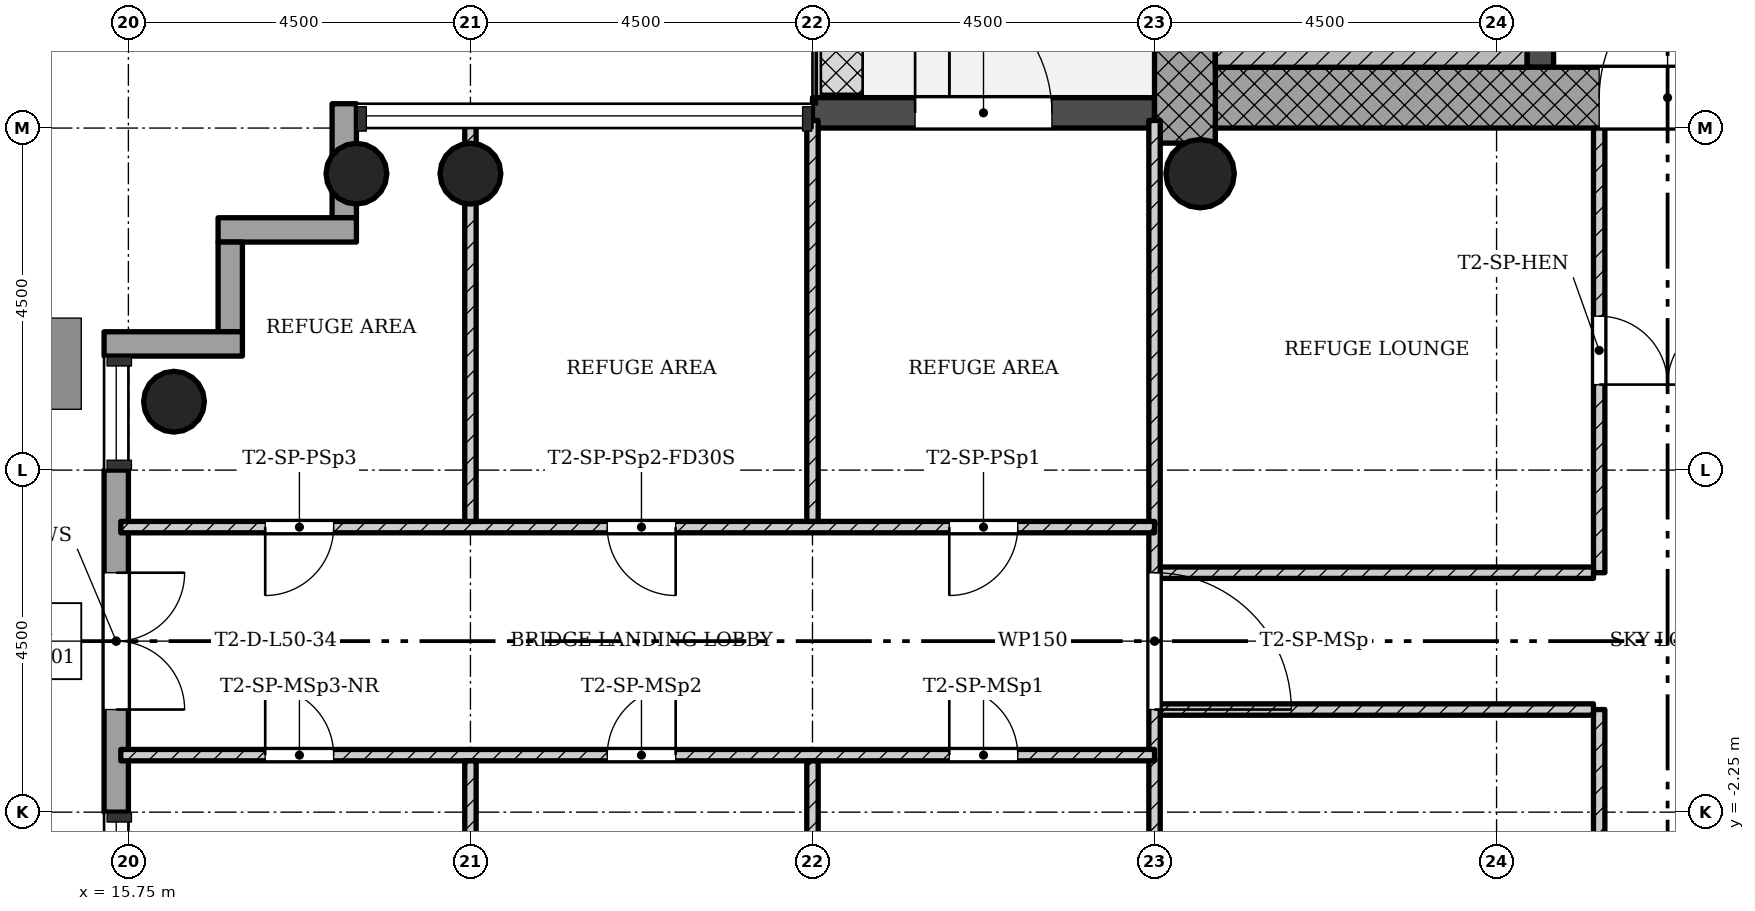
"""IFC4 building model, lengths in metres.
Left out: names, types, materials, properties, quantities, classifications, styles, units other than length and angle.
Written with IfcOpenShell. Run it as: python <this file> out.ifc"""

import sys

from ifc_helpers import new_model, si_unit, direction, frame, frame_2d, origin, origin_2d, place, context, subcontext, project, spatial, rectangle, hollow_circle, extrude, element, fill, save


model = new_model("IFC4")
c1 = context("Model", 3, precision=1e-05, world=origin(), true_north=direction((0.0, 1.0)))
c2 = subcontext(c1, "Body", "Model", "MODEL_VIEW")
j1 = project(units=[si_unit("LENGTHUNIT", "METRE"), si_unit("PLANEANGLEUNIT", "RADIAN")], contexts=[c1])
p1 = place(None, origin())
s1 = spatial("IfcSite", under=j1, at=p1, CompositionType="ELEMENT")
p2 = place(p1, origin())
s2 = spatial("IfcBuilding", under=s1, at=p2, CompositionType="ELEMENT")
p3 = place(p2, frame((0.0, 0.0, 181.3)))
s3 = spatial("IfcBuildingStorey", under=s2, at=p3, CompositionType="ELEMENT", Elevation=181.3)
p4 = place(p3, frame((30.05, 7.15, 0.0), z_axis=(0.0, 0.0, 1.0), x_axis=(1.0, 0.0, 0.0)))
e1 = element("IfcWall", 1, at=p4, inside=s3, PredefinedType="SHEAR", context=c2, shape_type="SweptSolid", body=[
    extrude(rectangle(XDim=12.7, YDim=0.8, at=frame_2d((6.35, 0.0))), origin(), (0.0, 0.0, 1.0), 4.5),
])
p5 = place(p4, frame((5.05, 0.0, 0.0)))
e2 = element("IfcOpeningElement", 2, at=p5, cuts=e1, PredefinedType="OPENING", context=c2, shape_type="SweptSolid", body=[
    extrude(rectangle(XDim=1.8, YDim=2.1, at=frame_2d((0.9, 1.05))), frame((0.0, 0.41, 0.0), z_axis=(0.0, -1.0, 0.0), x_axis=(1.0, 0.0, 0.0)), (0.0, 0.0, 1.0), 0.82),
])
p6 = place(p3, frame((29.65, 15.348, 0.0), z_axis=(0.0, 0.0, 1.0), x_axis=(0.0, -1.0, 0.0)))
e3 = element("IfcWall", 3, at=p6, inside=s3, PredefinedType="SHEAR", context=c2, shape_type="SweptSolid", body=[
    extrude(rectangle(XDim=8.796, YDim=0.8, at=frame_2d((4.398, 0.0))), origin(), (0.0, 0.0, 1.0), 4.5),
])
p7 = place(p3, frame((34.325, 7.55, 0.0), z_axis=(0.0, 0.0, 1.0), x_axis=(0.0, 1.0, 0.0)))
e4 = element("IfcWall", 4, at=p7, inside=s3, PredefinedType="SHEAR", context=c2, shape_type="SweptSolid", body=[
    extrude(rectangle(XDim=7.4, YDim=0.35, at=frame_2d((3.7, 0.0))), origin(), (0.0, 0.0, 1.0), 4.5),
])
p8 = place(p7, frame((0.85, 0.0, 0.0)))
e5 = element("IfcOpeningElement", 5, at=p8, cuts=e4, PredefinedType="OPENING", context=c2, shape_type="SweptSolid", body=[
    extrude(rectangle(XDim=0.9, YDim=2.1, at=frame_2d((0.45, 1.05))), frame((0.0, 0.185, 0.0), z_axis=(0.0, -1.0, 0.0), x_axis=(1.0, 0.0, 0.0)), (0.0, 0.0, 1.0), 0.37),
])
for number, where, z_axis, x_axis in (
    (6, (20.25, 6.15, 0.0), (0.0, 0.0, 1.0), (1.0, 0.0, 0.0)),
    (7, (18.75, 6.15, 0.0), (0.0, 0.0, 1.0), (1.0, 0.0, 0.0)),
    (8, (16.35, 3.15, 0.0), (0.0, 0.0, 1.0), (1.0, 0.0, 0.0)),
):
    element("IfcColumn", number, at=place(p3, frame(where, z_axis=z_axis, x_axis=x_axis)), inside=s3, PredefinedType="COLUMN", context=c2, shape_type="SweptSolid", body=[
        extrude(hollow_circle(Radius=0.4, WallThickness=0.028, at=origin_2d()), origin(), (0.0, 0.0, 1.0), 4.5),
    ])
p9 = place(p3, frame((29.85, 6.15, 0.0), z_axis=(0.0, 0.0, 1.0), x_axis=(1.0, 0.0, 0.0)))
e9 = element("IfcColumn", 9, at=p9, inside=s3, PredefinedType="COLUMN", context=c2, shape_type="SweptSolid", body=[
    extrude(hollow_circle(Radius=0.45, WallThickness=0.032, at=origin_2d()), origin(), (0.0, 0.0, 1.0), 4.5),
])
p10 = place(p3, frame((29.25, 6.95, -0.02), z_axis=(0.0, 0.0, 1.0), x_axis=(-1.0, 0.0, 0.0)))
e10 = element("IfcWall", 10, at=p10, inside=s3, PredefinedType="STANDARD", context=c2, shape_type="SweptSolid", body=[
    extrude(rectangle(XDim=4.5, YDim=0.4, at=frame_2d((2.25, 0.0))), origin(), (0.0, 0.0, 1.0), 4.22),
])
p11 = place(p10, frame((1.35, 0.0, 0.02)))
e11 = element("IfcOpeningElement", 11, at=p11, cuts=e10, PredefinedType="OPENING", context=c2, shape_type="SweptSolid", body=[
    extrude(rectangle(XDim=1.8, YDim=2.1, at=frame_2d((0.9, 1.05))), frame((0.0, 0.21, 0.0), z_axis=(0.0, -1.0, 0.0), x_axis=(1.0, 0.0, 0.0)), (0.0, 0.0, 1.0), 0.42),
])
p12 = place(p3, frame((18.59, 7.07, -0.3), z_axis=(0.0, 0.0, 1.0), x_axis=(0.0, -1.0, 0.0)))
e12 = element("IfcWall", 12, at=p12, inside=s3, PredefinedType="STANDARD", context=c2, shape_type="SweptSolid", body=[
    extrude(rectangle(XDim=1.5, YDim=0.32, at=frame_2d((0.75, 0.0))), origin(), (0.0, 0.0, 1.0), 4.5),
])
p13 = place(p3, frame((18.75, 5.41, -0.3), z_axis=(0.0, 0.0, 1.0), x_axis=(-1.0, 0.0, 0.0)))
e13 = element("IfcWall", 13, at=p13, inside=s3, PredefinedType="STANDARD", context=c2, shape_type="SweptSolid", body=[
    extrude(rectangle(XDim=1.82, YDim=0.32, at=frame_2d((0.91, 0.0))), origin(), (0.0, 0.0, 1.0), 4.5),
])
p14 = place(p3, frame((17.09, 5.25, -0.3), z_axis=(0.0, 0.0, 1.0), x_axis=(0.0, -1.0, 0.0)))
e14 = element("IfcWall", 14, at=p14, inside=s3, PredefinedType="STANDARD", context=c2, shape_type="SweptSolid", body=[
    extrude(rectangle(XDim=1.18, YDim=0.32, at=frame_2d((0.59, 0.0))), origin(), (0.0, 0.0, 1.0), 4.5),
])
p15 = place(p3, frame((17.25, 3.91, -0.3), z_axis=(0.0, 0.0, 1.0), x_axis=(-1.0, 0.0, 0.0)))
e15 = element("IfcWall", 15, at=p15, inside=s3, PredefinedType="STANDARD", context=c2, shape_type="SweptSolid", body=[
    extrude(rectangle(XDim=1.82, YDim=0.32, at=frame_2d((0.91, 0.0))), origin(), (0.0, 0.0, 1.0), 4.5),
])
p16 = place(p3, frame((15.59, 2.25, 0.0), z_axis=(0.0, 0.0, 1.0), x_axis=(0.0, -1.0, 0.0)))
e16 = element("IfcWall", 16, at=p16, inside=s3, PredefinedType="STANDARD", context=c2, shape_type="SweptSolid", body=[
    extrude(rectangle(XDim=4.5, YDim=0.32, at=frame_2d((2.25, 0.0))), origin(), (0.0, 0.0, 1.0), 4.2),
])
p17 = place(p16, frame((1.35, 0.0, 0.0)))
e17 = element("IfcOpeningElement", 17, at=p17, cuts=e16, PredefinedType="OPENING", context=c2, shape_type="SweptSolid", body=[
    extrude(rectangle(XDim=1.8, YDim=2.1, at=frame_2d((0.9, 1.05))), frame((0.0, 0.17, 0.0), z_axis=(0.0, -1.0, 0.0), x_axis=(1.0, 0.0, 0.0)), (0.0, 0.0, 1.0), 0.34),
])
p18 = place(p3, frame((35.1, 0.9, 0.0), z_axis=(0.0, 0.0, 1.0), x_axis=(0.0, 1.0, 0.0)))
e18 = element("IfcWall", 18, at=p18, inside=s3, PredefinedType="PARTITIONING", context=c2, shape_type="SweptSolid", body=[
    extrude(rectangle(XDim=5.85, YDim=0.15, at=frame_2d((2.925, 0.0))), origin(), (0.0, 0.0, 1.0), 4.08),
])
p19 = place(p18, frame((2.475, 0.0, 0.0)))
e19 = element("IfcOpeningElement", 19, at=p19, cuts=e18, PredefinedType="OPENING", context=c2, shape_type="SweptSolid", body=[
    extrude(rectangle(XDim=0.9, YDim=2.1, at=frame_2d((0.45, 1.05))), frame((0.0, 0.085, 0.0), z_axis=(0.0, -1.0, 0.0), x_axis=(1.0, 0.0, 0.0)), (0.0, 0.0, 1.0), 0.17),
])
p20 = place(p3, frame((35.025, 0.9, 0.0), z_axis=(0.0, 0.0, 1.0), x_axis=(-1.0, 0.0, 0.0)))
e20 = element("IfcWall", 20, at=p20, inside=s3, PredefinedType="PARTITIONING", context=c2, shape_type="SweptSolid", body=[
    extrude(rectangle(XDim=5.7, YDim=0.15, at=frame_2d((2.85, 0.0))), origin(), (0.0, 0.0, 1.0), 4.08),
])
p21 = place(p3, frame((35.1, -6.75, 0.0), z_axis=(0.0, 0.0, 1.0), x_axis=(0.0, 1.0, 0.0)))
e21 = element("IfcWall", 21, at=p21, inside=s3, PredefinedType="PARTITIONING", context=c2, shape_type="SweptSolid", body=[
    extrude(rectangle(XDim=5.85, YDim=0.15, at=frame_2d((2.925, 0.0))), origin(), (0.0, 0.0, 1.0), 4.08),
])
p22 = place(p21, frame((2.475, 0.0, 0.0)))
e22 = element("IfcOpeningElement", 22, at=p22, cuts=e21, PredefinedType="OPENING", context=c2, shape_type="SweptSolid", body=[
    extrude(rectangle(XDim=0.9, YDim=2.1, at=frame_2d((0.45, 1.05))), frame((0.0, 0.085, 0.0), z_axis=(0.0, -1.0, 0.0), x_axis=(1.0, 0.0, 0.0)), (0.0, 0.0, 1.0), 0.17),
])
p23 = place(p3, frame((35.025, -0.9, 0.0), z_axis=(0.0, 0.0, 1.0), x_axis=(-1.0, 0.0, 0.0)))
e23 = element("IfcWall", 23, at=p23, inside=s3, PredefinedType="PARTITIONING", context=c2, shape_type="SweptSolid", body=[
    extrude(rectangle(XDim=5.7, YDim=0.15, at=frame_2d((2.85, 0.0))), origin(), (0.0, 0.0, 1.0), 4.08),
])
p24 = place(p3, frame((29.25, -6.85, 0.0), z_axis=(0.0, 0.0, 1.0), x_axis=(0.0, 1.0, 0.0)))
e24 = element("IfcWall", 24, at=p24, inside=s3, PredefinedType="PARTITIONING", context=c2, shape_type="SweptSolid", body=[
    extrude(rectangle(XDim=13.7, YDim=0.15, at=frame_2d((6.85, 0.0))), origin(), (0.0, 0.0, 1.0), 4.08),
])
p25 = place(p24, frame((5.95, 0.0, 0.0)))
e25 = element("IfcOpeningElement", 25, at=p25, cuts=e24, PredefinedType="OPENING", context=c2, shape_type="SweptSolid", body=[
    extrude(rectangle(XDim=1.8, YDim=2.1, at=frame_2d((0.9, 1.05))), frame((0.0, 0.085, 0.0), z_axis=(0.0, -1.0, 0.0), x_axis=(1.0, 0.0, 0.0)), (0.0, 0.0, 1.0), 0.17),
])
p26 = place(p3, frame((29.25, 1.5, 0.0), z_axis=(0.0, 0.0, 1.0), x_axis=(-1.0, 0.0, 0.0)))
e26 = element("IfcWall", 26, at=p26, inside=s3, PredefinedType="PARTITIONING", context=c2, shape_type="SweptSolid", body=[
    extrude(rectangle(XDim=13.6, YDim=0.15, at=frame_2d((6.8, 0.0))), origin(), (0.0, 0.0, 1.0), 4.08),
])
p27 = place(p26, frame((1.8, 0.0, 0.0)))
e27 = element("IfcOpeningElement", 27, at=p27, cuts=e26, PredefinedType="OPENING", context=c2, shape_type="SweptSolid", body=[
    extrude(rectangle(XDim=0.9, YDim=2.1, at=frame_2d((0.45, 1.05))), frame((0.0, 0.085, 0.0), z_axis=(0.0, -1.0, 0.0), x_axis=(1.0, 0.0, 0.0)), (0.0, 0.0, 1.0), 0.17),
])
p28 = place(p26, frame((6.3, 0.0, 0.0)))
e28 = element("IfcOpeningElement", 28, at=p28, cuts=e26, PredefinedType="OPENING", context=c2, shape_type="SweptSolid", body=[
    extrude(rectangle(XDim=0.9, YDim=2.1, at=frame_2d((0.45, 1.05))), frame((0.0, 0.085, 0.0), z_axis=(0.0, -1.0, 0.0), x_axis=(1.0, 0.0, 0.0)), (0.0, 0.0, 1.0), 0.17),
])
p29 = place(p26, frame((10.8, 0.0, 0.0)))
e29 = element("IfcOpeningElement", 29, at=p29, cuts=e26, PredefinedType="OPENING", context=c2, shape_type="SweptSolid", body=[
    extrude(rectangle(XDim=0.9, YDim=2.1, at=frame_2d((0.45, 1.05))), frame((0.0, 0.085, 0.0), z_axis=(0.0, -1.0, 0.0), x_axis=(1.0, 0.0, 0.0)), (0.0, 0.0, 1.0), 0.17),
])
for number, where, z_axis, x_axis in (
    (30, (24.75, 1.575, 0.0), (0.0, 0.0, 1.0), (0.0, 1.0, 0.0)),
    (31, (20.25, 1.575, 0.0), (0.0, 0.0, 1.0), (0.0, 1.0, 0.0)),
):
    element("IfcWall", number, at=place(p3, frame(where, z_axis=z_axis, x_axis=x_axis)), inside=s3, PredefinedType="PARTITIONING", context=c2, shape_type="SweptSolid", body=[
        extrude(rectangle(XDim=5.275, YDim=0.15, at=frame_2d((2.638, 0.0))), origin(), (0.0, 0.0, 1.0), 4.08),
    ])
p30 = place(p3, frame((29.25, -1.5, 0.0), z_axis=(0.0, 0.0, 1.0), x_axis=(-1.0, 0.0, 0.0)))
e32 = element("IfcWall", 32, at=p30, inside=s3, PredefinedType="PARTITIONING", context=c2, shape_type="SweptSolid", body=[
    extrude(rectangle(XDim=13.6, YDim=0.15, at=frame_2d((6.8, 0.0))), origin(), (0.0, 0.0, 1.0), 4.08),
])
p31 = place(p30, frame((1.8, 0.0, 0.0)))
e33 = element("IfcOpeningElement", 33, at=p31, cuts=e32, PredefinedType="OPENING", context=c2, shape_type="SweptSolid", body=[
    extrude(rectangle(XDim=0.9, YDim=2.1, at=frame_2d((0.45, 1.05))), frame((0.0, 0.085, 0.0), z_axis=(0.0, -1.0, 0.0), x_axis=(1.0, 0.0, 0.0)), (0.0, 0.0, 1.0), 0.17),
])
p32 = place(p30, frame((6.3, 0.0, 0.0)))
e34 = element("IfcOpeningElement", 34, at=p32, cuts=e32, PredefinedType="OPENING", context=c2, shape_type="SweptSolid", body=[
    extrude(rectangle(XDim=0.9, YDim=2.1, at=frame_2d((0.45, 1.05))), frame((0.0, 0.085, 0.0), z_axis=(0.0, -1.0, 0.0), x_axis=(1.0, 0.0, 0.0)), (0.0, 0.0, 1.0), 0.17),
])
p33 = place(p30, frame((10.8, 0.0, 0.0)))
e35 = element("IfcOpeningElement", 35, at=p33, cuts=e32, PredefinedType="OPENING", context=c2, shape_type="SweptSolid", body=[
    extrude(rectangle(XDim=0.9, YDim=2.1, at=frame_2d((0.45, 1.05))), frame((0.0, 0.085, 0.0), z_axis=(0.0, -1.0, 0.0), x_axis=(1.0, 0.0, 0.0)), (0.0, 0.0, 1.0), 0.17),
])
for number, where, z_axis, x_axis in (
    (36, (24.75, -1.575, 0.0), (0.0, 0.0, 1.0), (0.0, -1.0, 0.0)),
    (37, (20.25, -1.575, 0.0), (0.0, 0.0, 1.0), (0.0, -1.0, 0.0)),
):
    element("IfcWall", number, at=place(p3, frame(where, z_axis=z_axis, x_axis=x_axis)), inside=s3, PredefinedType="PARTITIONING", context=c2, shape_type="SweptSolid", body=[
        extrude(rectangle(XDim=5.275, YDim=0.15, at=frame_2d((2.638, 0.0))), origin(), (0.0, 0.0, 1.0), 4.08),
    ])
p34 = place(p3, frame((34.15, 7.75, 0.0), z_axis=(0.0, 0.0, 1.0), x_axis=(-1.0, 0.0, 0.0)))
e38 = element("IfcWall", 38, at=p34, inside=s3, PredefinedType="SHEAR", context=c2, shape_type="SweptSolid", body=[
    extrude(rectangle(XDim=4.1, YDim=0.4, at=frame_2d((2.05, 0.0))), origin(), (0.0, 0.0, 1.0), 4.5),
])
p35 = place(p11, origin())
e39 = element("IfcDoor", 39, at=p35, inside=s3, OperationType="SINGLE_SWING_RIGHT", PredefinedType="DOOR", context=c2, shape_type="SweptSolid", body=[
    extrude(rectangle(XDim=1.8, YDim=2.1, at=frame_2d((0.9, 1.05))), frame((0.0, 0.025, 0.0), z_axis=(0.0, -1.0, 0.0), x_axis=(1.0, 0.0, 0.0)), (0.0, 0.0, 1.0), 0.05),
])
fill(e11, e39)
p36 = place(p17, origin())
e40 = element("IfcDoor", 40, at=p36, inside=s3, OperationType="DOUBLE_DOOR_SINGLE_SWING", PredefinedType="DOOR", context=c2, shape_type="SweptSolid", body=[
    extrude(rectangle(XDim=1.8, YDim=2.1, at=frame_2d((0.9, 1.05))), frame((0.0, 0.025, 0.0), z_axis=(0.0, -1.0, 0.0), x_axis=(1.0, 0.0, 0.0)), (0.0, 0.0, 1.0), 0.05),
])
fill(e17, e40)
p37 = place(p19, origin())
e41 = element("IfcDoor", 41, at=p37, inside=s3, OperationType="SINGLE_SWING_LEFT", PredefinedType="DOOR", context=c2, shape_type="SweptSolid", body=[
    extrude(rectangle(XDim=0.9, YDim=2.1, at=frame_2d((0.45, 1.05))), frame((0.0, 0.025, 0.0), z_axis=(0.0, -1.0, 0.0), x_axis=(1.0, 0.0, 0.0)), (0.0, 0.0, 1.0), 0.05),
])
fill(e19, e41)
p38 = place(p25, origin())
e42 = element("IfcDoor", 42, at=p38, inside=s3, OperationType="SINGLE_SWING_LEFT", PredefinedType="DOOR", context=c2, shape_type="SweptSolid", body=[
    extrude(rectangle(XDim=1.8, YDim=2.1, at=frame_2d((0.9, 1.05))), frame((0.0, 0.025, 0.0), z_axis=(0.0, -1.0, 0.0), x_axis=(1.0, 0.0, 0.0)), (0.0, 0.0, 1.0), 0.05),
])
fill(e25, e42)
p39 = place(p27, origin())
e43 = element("IfcDoor", 43, at=p39, inside=s3, OperationType="SINGLE_SWING_LEFT", PredefinedType="DOOR", context=c2, shape_type="SweptSolid", body=[
    extrude(rectangle(XDim=0.9, YDim=2.1, at=frame_2d((0.45, 1.05))), frame((0.0, 0.025, 0.0), z_axis=(0.0, -1.0, 0.0), x_axis=(1.0, 0.0, 0.0)), (0.0, 0.0, 1.0), 0.05),
])
fill(e27, e43)
p40 = place(p28, origin())
e44 = element("IfcDoor", 44, at=p40, inside=s3, OperationType="SINGLE_SWING_RIGHT", PredefinedType="DOOR", context=c2, shape_type="SweptSolid", body=[
    extrude(rectangle(XDim=0.9, YDim=2.1, at=frame_2d((0.45, 1.05))), frame((0.0, 0.025, 0.0), z_axis=(0.0, -1.0, 0.0), x_axis=(1.0, 0.0, 0.0)), (0.0, 0.0, 1.0), 0.05),
])
fill(e28, e44)
p41 = place(p29, origin())
e45 = element("IfcDoor", 45, at=p41, inside=s3, OperationType="SINGLE_SWING_LEFT", PredefinedType="DOOR", context=c2, shape_type="SweptSolid", body=[
    extrude(rectangle(XDim=0.9, YDim=2.1, at=frame_2d((0.45, 1.05))), frame((0.0, 0.025, 0.0), z_axis=(0.0, -1.0, 0.0), x_axis=(1.0, 0.0, 0.0)), (0.0, 0.0, 1.0), 0.05),
])
fill(e29, e45)
p42 = place(p31, origin())
e46 = element("IfcDoor", 46, at=p42, inside=s3, OperationType="SINGLE_SWING_RIGHT", PredefinedType="DOOR", context=c2, shape_type="SweptSolid", body=[
    extrude(rectangle(XDim=0.9, YDim=2.1, at=frame_2d((0.45, 1.05))), frame((0.0, 0.025, 0.0), z_axis=(0.0, -1.0, 0.0), x_axis=(1.0, 0.0, 0.0)), (0.0, 0.0, 1.0), 0.05),
])
fill(e33, e46)
p43 = place(p32, origin())
e47 = element("IfcDoor", 47, at=p43, inside=s3, OperationType="SINGLE_SWING_LEFT", PredefinedType="DOOR", context=c2, shape_type="SweptSolid", body=[
    extrude(rectangle(XDim=0.9, YDim=2.1, at=frame_2d((0.45, 1.05))), frame((0.0, 0.025, 0.0), z_axis=(0.0, -1.0, 0.0), x_axis=(1.0, 0.0, 0.0)), (0.0, 0.0, 1.0), 0.05),
])
fill(e34, e47)
p44 = place(p33, origin())
e48 = element("IfcDoor", 48, at=p44, inside=s3, OperationType="SINGLE_SWING_RIGHT", PredefinedType="DOOR", context=c2, shape_type="SweptSolid", body=[
    extrude(rectangle(XDim=0.9, YDim=2.1, at=frame_2d((0.45, 1.05))), frame((0.0, 0.025, 0.0), z_axis=(0.0, -1.0, 0.0), x_axis=(1.0, 0.0, 0.0)), (0.0, 0.0, 1.0), 0.05),
])
fill(e35, e48)
p45 = place(p5, origin())
e49 = element("IfcDoor", 49, at=p45, inside=s3, OperationType="SINGLE_SWING_LEFT", PredefinedType="DOOR", context=c2, shape_type="SweptSolid", body=[
    extrude(rectangle(XDim=1.8, YDim=2.1, at=frame_2d((0.9, 1.05))), frame((0.0, 0.025, 0.0), z_axis=(0.0, -1.0, 0.0), x_axis=(1.0, 0.0, 0.0)), (0.0, 0.0, 1.0), 0.05),
])
fill(e2, e49)
save(model, sys.argv[1])
